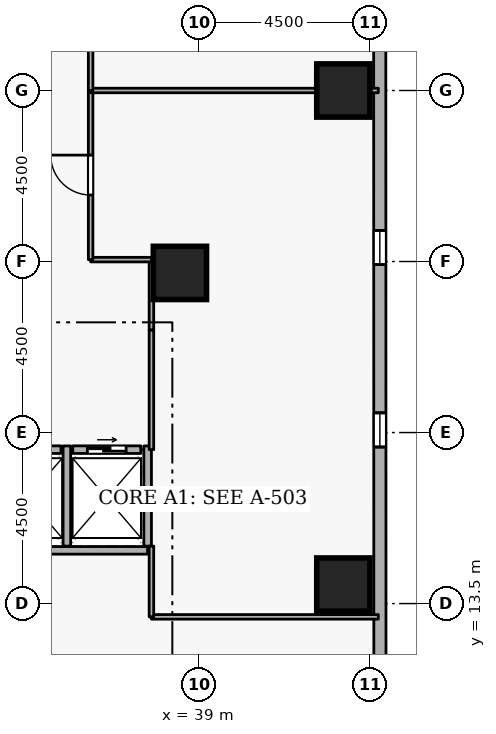
"""IFC4 building model, lengths in metres.
Left out: names, types, materials, properties, quantities, classifications, styles, units other than length and angle.
Written with IfcOpenShell. Run it as: python <this file> out.ifc"""

import sys

from ifc_helpers import new_model, si_unit, direction, frame, frame_2d, origin, origin_2d, place, context, subcontext, project, spatial, rectangle, extrude, element, fill, save


model = new_model("IFC4")
c1 = context("Model", 3, precision=1e-05, world=origin(), true_north=direction((0.0, 1.0)))
c2 = subcontext(c1, "Body", "Model", "MODEL_VIEW")
j1 = project(units=[si_unit("LENGTHUNIT", "METRE"), si_unit("PLANEANGLEUNIT", "RADIAN")], contexts=[c1])
p1 = place(None, origin())
s1 = spatial("IfcSite", under=j1, at=p1, CompositionType="ELEMENT")
p2 = place(p1, origin())
s2 = spatial("IfcBuilding", under=s1, at=p2, CompositionType="ELEMENT")
p3 = place(p2, frame((0.0, 0.0, 31.5)))
s3 = spatial("IfcBuildingStorey", under=s2, at=p3, CompositionType="ELEMENT", Elevation=31.5)
for number, where, z_axis, x_axis in (
    (1, (42.8, 14.0, 0.0), (0.0, 0.0, 1.0), (1.0, 0.0, 0.0)),
    (2, (42.8, 27.0, 0.0), (0.0, 0.0, 1.0), (1.0, 0.0, 0.0)),
    (3, (38.5, 22.2, 0.0), (0.0, 0.0, 1.0), (1.0, 0.0, 0.0)),
):
    element("IfcColumn", number, at=place(p3, frame(where, z_axis=z_axis, x_axis=x_axis)), inside=s3, PredefinedType="COLUMN", context=c2, shape_type="SweptSolid", body=[
        extrude(rectangle(XDim=1.4, YDim=1.4, at=origin_2d()), origin(), (0.0, 0.0, 1.0), 3.6),
    ])
p4 = place(p3, frame((43.765, 5.319, 0.0), z_axis=(0.0, 0.0, 1.0), x_axis=(-0.000307837676, 0.999999952618, 0.0)))
e4 = element("IfcWall", 4, at=p4, inside=s3, PredefinedType="STANDARD", context=c2, shape_type="SweptSolid", body=[
    extrude(rectangle(XDim=34.103, YDim=0.32, at=frame_2d((17.051, 0.0))), origin(), (0.0, 0.0, 1.0), 2.7),
])
p5 = place(p4, frame((2.7, 0.0, 0.72)))
e5 = element("IfcOpeningElement", 5, at=p5, cuts=e4, PredefinedType="OPENING", context=c2, shape_type="SweptSolid", body=[
    extrude(rectangle(XDim=0.9, YDim=1.75, at=frame_2d((0.45, 0.875))), frame((0.0, 0.17, 0.0), z_axis=(0.0, -1.0, 0.0), x_axis=(1.0, 0.0, 0.0)), (0.0, 0.0, 1.0), 0.34),
])
p6 = place(p4, frame((12.3, 0.0, 0.72)))
e6 = element("IfcOpeningElement", 6, at=p6, cuts=e4, PredefinedType="OPENING", context=c2, shape_type="SweptSolid", body=[
    extrude(rectangle(XDim=0.9, YDim=1.75, at=frame_2d((0.45, 0.875))), frame((0.0, 0.17, 0.0), z_axis=(0.0, -1.0, 0.0), x_axis=(1.0, 0.0, 0.0)), (0.0, 0.0, 1.0), 0.34),
])
p7 = place(p4, frame((17.1, 0.0, 0.72)))
e7 = element("IfcOpeningElement", 7, at=p7, cuts=e4, PredefinedType="OPENING", context=c2, shape_type="SweptSolid", body=[
    extrude(rectangle(XDim=0.9, YDim=1.75, at=frame_2d((0.45, 0.875))), frame((0.0, 0.17, 0.0), z_axis=(0.0, -1.0, 0.0), x_axis=(1.0, 0.0, 0.0)), (0.0, 0.0, 1.0), 0.34),
])
p8 = place(p4, frame((26.7, 0.0, 0.72)))
e8 = element("IfcOpeningElement", 8, at=p8, cuts=e4, PredefinedType="OPENING", context=c2, shape_type="SweptSolid", body=[
    extrude(rectangle(XDim=0.9, YDim=1.75, at=frame_2d((0.45, 0.875))), frame((0.0, 0.17, 0.0), z_axis=(0.0, -1.0, 0.0), x_axis=(1.0, 0.0, 0.0)), (0.0, 0.0, 1.0), 0.34),
])
p9 = place(p4, frame((31.5, 0.0, 0.72)))
e9 = element("IfcOpeningElement", 9, at=p9, cuts=e4, PredefinedType="OPENING", context=c2, shape_type="SweptSolid", body=[
    extrude(rectangle(XDim=0.9, YDim=1.75, at=frame_2d((0.45, 0.875))), frame((0.0, 0.17, 0.0), z_axis=(0.0, -1.0, 0.0), x_axis=(1.0, 0.0, 0.0)), (0.0, 0.0, 1.0), 0.34),
])
p10 = place(p3, frame((33.63, 17.55, 0.0), z_axis=(0.0, 0.0, 1.0), x_axis=(1.0, 0.0, 0.0)))
e10 = element("IfcWall", 10, at=p10, inside=s3, PredefinedType="STANDARD", context=c2, shape_type="SweptSolid", body=[
    extrude(rectangle(XDim=1.74, YDim=0.2, at=frame_2d((0.87, 0.0))), origin(), (0.0, 0.0, 1.0), 3.34),
])
p11 = place(p10, frame((0.36, 0.0, 0.0)))
e11 = element("IfcOpeningElement", 11, at=p11, cuts=e10, PredefinedType="OPENING", context=c2, shape_type="SweptSolid", body=[
    extrude(rectangle(XDim=1.02, YDim=2.06, at=frame_2d((0.51, 1.03))), frame((0.0, 0.11, 0.0), z_axis=(0.0, -1.0, 0.0), x_axis=(1.0, 0.0, 0.0)), (0.0, 0.0, 1.0), 0.22),
])
p12 = place(p3, frame((35.68, 17.55, 0.0), z_axis=(0.0, 0.0, 1.0), x_axis=(1.0, 0.0, 0.0)))
e12 = element("IfcWall", 12, at=p12, inside=s3, PredefinedType="STANDARD", context=c2, shape_type="SweptSolid", body=[
    extrude(rectangle(XDim=1.79, YDim=0.2, at=frame_2d((0.895, 0.0))), origin(), (0.0, 0.0, 1.0), 3.34),
])
p13 = place(p12, frame((0.385, 0.0, 0.0)))
e13 = element("IfcOpeningElement", 13, at=p13, cuts=e12, PredefinedType="OPENING", context=c2, shape_type="SweptSolid", body=[
    extrude(rectangle(XDim=1.02, YDim=2.06, at=frame_2d((0.51, 1.03))), frame((0.0, 0.11, 0.0), z_axis=(0.0, -1.0, 0.0), x_axis=(1.0, 0.0, 0.0)), (0.0, 0.0, 1.0), 0.22),
])
p14 = place(p3, frame((33.452, 14.9, 0.0), z_axis=(0.0, 0.0, 1.0), x_axis=(1.0, 0.0, 0.0)))
e14 = element("IfcWall", 14, at=p14, inside=s3, PredefinedType="STANDARD", context=c2, shape_type="SweptSolid", body=[
    extrude(rectangle(XDim=4.196, YDim=0.2, at=frame_2d((2.098, 0.0))), origin(), (0.0, 0.0, 1.0), 3.34),
])
for number, where, z_axis, x_axis in (
    (15, (35.525, 15.012, 0.0), (0.0, 0.0, 1.0), (0.0, 1.0, 0.0)),
    (16, (37.65, 15.012, 0.0), (0.0, 0.0, 1.0), (0.0, 1.0, 0.0)),
):
    element("IfcWall", number, at=place(p3, frame(where, z_axis=z_axis, x_axis=x_axis)), inside=s3, PredefinedType="STANDARD", context=c2, shape_type="SweptSolid", body=[
        extrude(rectangle(XDim=2.636, YDim=0.2, at=frame_2d((1.318, 0.0))), origin(), (0.0, 0.0, 1.0), 3.34),
    ])
p15 = place(p3, frame((37.75, 17.55, 0.0), z_axis=(0.0, 0.0, 1.0), x_axis=(0.0, 1.0, 0.0)))
e17 = element("IfcWall", 17, at=p15, inside=s3, PredefinedType="PARTITIONING", context=c2, shape_type="SweptSolid", body=[
    extrude(rectangle(XDim=3.15, YDim=0.12, at=frame_2d((1.575, 0.0))), origin(), (0.0, 0.0, 1.0), 3.34),
])
p16 = place(p3, frame((37.75, 20.7, 0.0), z_axis=(0.0, 0.0, 1.0), x_axis=(0.0, 1.0, 0.0)))
e18 = element("IfcWall", 18, at=p16, inside=s3, PredefinedType="PARTITIONING", context=c2, shape_type="SweptSolid", body=[
    extrude(rectangle(XDim=1.85, YDim=0.12, at=frame_2d((0.925, 0.0))), origin(), (0.0, 0.0, 1.0), 3.34),
])
p17 = place(p3, frame((37.75, 22.55, 0.0), z_axis=(0.0, 0.0, 1.0), x_axis=(-1.0, 0.0, 0.0)))
e19 = element("IfcWall", 19, at=p17, inside=s3, PredefinedType="PARTITIONING", context=c2, shape_type="SweptSolid", body=[
    extrude(rectangle(XDim=1.6, YDim=0.12, at=frame_2d((0.8, 0.0))), origin(), (0.0, 0.0, 1.0), 3.34),
])
p18 = place(p3, frame((36.15, 22.55, 0.0), z_axis=(0.0, 0.0, 1.0), x_axis=(0.0, 1.0, 0.0)))
e20 = element("IfcWall", 20, at=p18, inside=s3, PredefinedType="PARTITIONING", context=c2, shape_type="SweptSolid", body=[
    extrude(rectangle(XDim=4.45, YDim=0.12, at=frame_2d((2.225, 0.0))), origin(), (0.0, 0.0, 1.0), 3.34),
])
p19 = place(p18, frame((1.7, 0.0, 0.0)))
e21 = element("IfcOpeningElement", 21, at=p19, cuts=e20, PredefinedType="OPENING", context=c2, shape_type="SweptSolid", body=[
    extrude(rectangle(XDim=1.05, YDim=2.1, at=frame_2d((0.525, 1.05))), frame((0.0, 0.07, 0.0), z_axis=(0.0, -1.0, 0.0), x_axis=(1.0, 0.0, 0.0)), (0.0, 0.0, 1.0), 0.14),
])
p20 = place(p3, frame((36.15, 27.0, 0.0), z_axis=(0.0, 0.0, 1.0), x_axis=(1.0, 0.0, 0.0)))
e22 = element("IfcWall", 22, at=p20, inside=s3, PredefinedType="PARTITIONING", context=c2, shape_type="SweptSolid", body=[
    extrude(rectangle(XDim=7.57, YDim=0.12, at=frame_2d((3.785, 0.0))), origin(), (0.0, 0.0, 1.0), 2.878),
])
p21 = place(p3, frame((43.72, 13.15, 0.0), z_axis=(0.0, 0.0, 1.0), x_axis=(-1.0, 0.0, 0.0)))
e23 = element("IfcWall", 23, at=p21, inside=s3, PredefinedType="PARTITIONING", context=c2, shape_type="SweptSolid", body=[
    extrude(rectangle(XDim=5.97, YDim=0.12, at=frame_2d((2.985, 0.0))), origin(), (0.0, 0.0, 1.0), 3.34),
])
p22 = place(p3, frame((37.75, 13.15, 0.0), z_axis=(0.0, 0.0, 1.0), x_axis=(0.0, 1.0, 0.0)))
e24 = element("IfcWall", 24, at=p22, inside=s3, PredefinedType="PARTITIONING", context=c2, shape_type="SweptSolid", body=[
    extrude(rectangle(XDim=1.862, YDim=0.12, at=frame_2d((0.931, 0.0))), origin(), (0.0, 0.0, 1.0), 3.34),
])
p23 = place(p3, frame((36.15, 27.0, 0.0), z_axis=(0.0, 0.0, 1.0), x_axis=(0.0, 1.0, 0.0)))
e25 = element("IfcWall", 25, at=p23, inside=s3, PredefinedType="PARTITIONING", context=c2, shape_type="SweptSolid", body=[
    extrude(rectangle(XDim=4.45, YDim=0.12, at=frame_2d((2.225, 0.0))), origin(), (0.0, 0.0, 1.0), 3.34),
])
p24 = place(p23, frame((1.7, 0.0, 0.0)))
e26 = element("IfcOpeningElement", 26, at=p24, cuts=e25, PredefinedType="OPENING", context=c2, shape_type="SweptSolid", body=[
    extrude(rectangle(XDim=1.05, YDim=2.1, at=frame_2d((0.525, 1.05))), frame((0.0, 0.07, 0.0), z_axis=(0.0, -1.0, 0.0), x_axis=(1.0, 0.0, 0.0)), (0.0, 0.0, 1.0), 0.14),
])
p25 = place(p6, origin())
e27 = element("IfcWindow", 27, at=p25, inside=s3, PartitioningType="SINGLE_PANEL", PredefinedType="WINDOW", context=c2, shape_type="SweptSolid", body=[
    extrude(rectangle(XDim=0.9, YDim=1.75, at=frame_2d((0.45, 0.875))), frame((0.0, 0.03, 0.0), z_axis=(0.0, -1.0, 0.0), x_axis=(1.0, 0.0, 0.0)), (0.0, 0.0, 1.0), 0.06),
])
fill(e6, e27)
p26 = place(p7, origin())
e28 = element("IfcWindow", 28, at=p26, inside=s3, PartitioningType="SINGLE_PANEL", PredefinedType="WINDOW", context=c2, shape_type="SweptSolid", body=[
    extrude(rectangle(XDim=0.9, YDim=1.75, at=frame_2d((0.45, 0.875))), frame((0.0, 0.03, 0.0), z_axis=(0.0, -1.0, 0.0), x_axis=(1.0, 0.0, 0.0)), (0.0, 0.0, 1.0), 0.06),
])
fill(e7, e28)
p27 = place(p13, origin())
e29 = element("IfcDoor", 29, at=p27, inside=s3, OperationType="SLIDING_TO_LEFT", PredefinedType="DOOR", context=c2, shape_type="SweptSolid", body=[
    extrude(rectangle(XDim=1.02, YDim=2.06, at=frame_2d((0.51, 1.03))), frame((0.0, 0.025, 0.0), z_axis=(0.0, -1.0, 0.0), x_axis=(1.0, 0.0, 0.0)), (0.0, 0.0, 1.0), 0.05),
])
fill(e13, e29)
p28 = place(p19, origin())
e30 = element("IfcDoor", 30, at=p28, inside=s3, OperationType="SINGLE_SWING_RIGHT", PredefinedType="DOOR", context=c2, shape_type="SweptSolid", body=[
    extrude(rectangle(XDim=1.05, YDim=2.1, at=frame_2d((0.525, 1.05))), frame((0.0, 0.025, 0.0), z_axis=(0.0, -1.0, 0.0), x_axis=(1.0, 0.0, 0.0)), (0.0, 0.0, 1.0), 0.05),
])
fill(e21, e30)
save(model, sys.argv[1])
